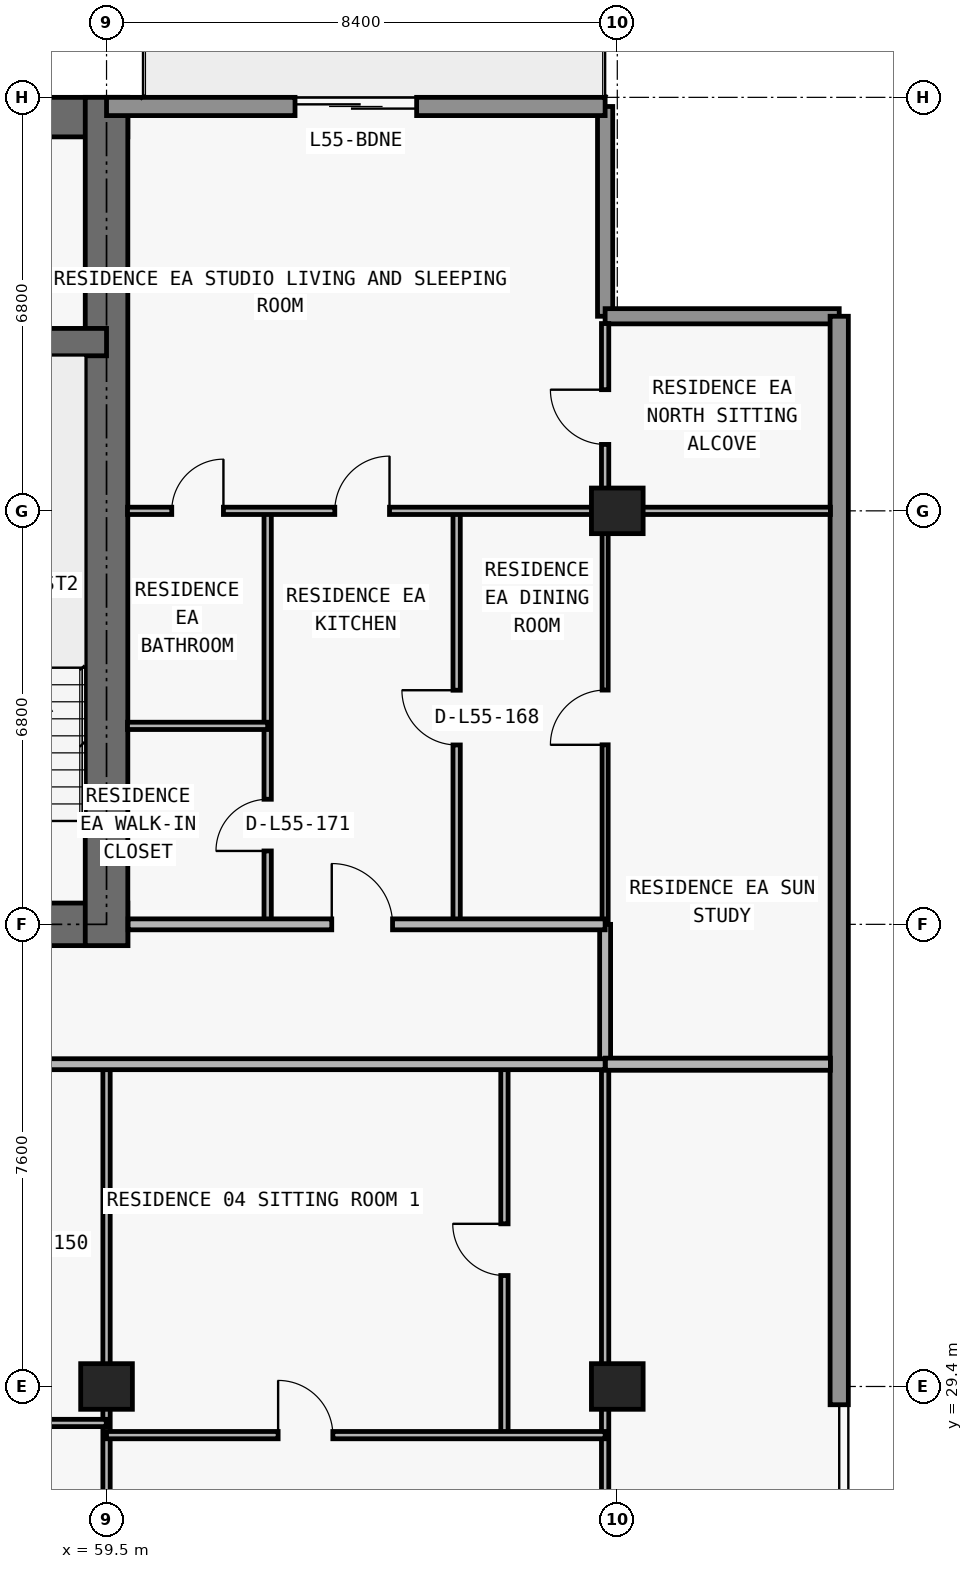
"""IFC4 building model, lengths in metres.
Left out: names, types, materials, properties, quantities, classifications, styles, units other than length and angle.
Written with IfcOpenShell. Run it as: python <this file> out.ifc"""

import sys

from ifc_helpers import new_model, si_unit, direction, frame, frame_2d, origin, origin_2d, place, context, subcontext, project, spatial, rectangle, extrude, element, fill, save


model = new_model("IFC4")
c1 = context("Model", 3, precision=1e-05, world=origin(), true_north=direction((0.0, 1.0)))
c2 = subcontext(c1, "Body", "Model", "MODEL_VIEW")
j1 = project(units=[si_unit("LENGTHUNIT", "METRE"), si_unit("PLANEANGLEUNIT", "RADIAN")], contexts=[c1])
p1 = place(None, origin())
s1 = spatial("IfcSite", under=j1, at=p1, CompositionType="ELEMENT")
p2 = place(p1, origin())
s2 = spatial("IfcBuilding", under=s1, at=p2, CompositionType="ELEMENT")
p3 = place(p2, frame((0.0, 0.0, 198.3)))
s3 = spatial("IfcBuildingStorey", under=s2, at=p3, CompositionType="ELEMENT", Elevation=198.3)
for number, where, z_axis, x_axis in (
    (1, (59.5, 29.4, 0.0), (0.0, 0.0, 1.0), (1.0, 0.0, 0.0)),
    (2, (67.9, 29.4, 0.0), (0.0, 0.0, 1.0), (1.0, 0.0, 0.0)),
    (3, (67.9, 43.8, 0.0), (0.0, 0.0, 1.0), (1.0, 0.0, 0.0)),
):
    element("IfcColumn", number, at=place(p3, frame(where, z_axis=z_axis, x_axis=x_axis)), inside=s3, PredefinedType="COLUMN", context=c2, shape_type="SweptSolid", body=[
        extrude(rectangle(XDim=0.85, YDim=0.75, at=origin_2d()), origin(), (0.0, 0.0, 1.0), 3.05),
    ])
p4 = place(p3, frame((17.95, 37.0, 0.0), z_axis=(0.0, 0.0, 1.0), x_axis=(1.0, 0.0, 0.0)))
e4 = element("IfcWall", 4, at=p4, inside=s3, PredefinedType="SHEAR", context=c2, shape_type="SweptSolid", body=[
    extrude(rectangle(XDim=41.9, YDim=0.7, at=frame_2d((20.95, 0.0))), origin(), (0.0, 0.0, 1.0), 3.05),
])
p5 = place(p4, frame((14.35, 0.0, 0.0)))
e5 = element("IfcOpeningElement", 5, at=p5, cuts=e4, PredefinedType="OPENING", context=c2, shape_type="SweptSolid", body=[
    extrude(rectangle(XDim=1.1, YDim=2.15, at=frame_2d((0.55, 1.075))), frame((0.0, 0.36, 0.0), z_axis=(0.0, -1.0, 0.0), x_axis=(1.0, 0.0, 0.0)), (0.0, 0.0, 1.0), 0.72),
])
p6 = place(p4, frame((6.2, 0.0, 0.0)))
e6 = element("IfcOpeningElement", 6, at=p6, cuts=e4, PredefinedType="OPENING", context=c2, shape_type="SweptSolid", body=[
    extrude(rectangle(XDim=1.05, YDim=2.15, at=frame_2d((0.525, 1.075))), frame((0.0, 0.36, 0.0), z_axis=(0.0, -1.0, 0.0), x_axis=(1.0, 0.0, 0.0)), (0.0, 0.0, 1.0), 0.72),
])
p7 = place(p4, frame((34.7, 0.0, 0.0)))
e7 = element("IfcOpeningElement", 7, at=p7, cuts=e4, PredefinedType="OPENING", context=c2, shape_type="SweptSolid", body=[
    extrude(rectangle(XDim=1.05, YDim=2.15, at=frame_2d((0.525, 1.075))), frame((0.0, 0.36, 0.0), z_axis=(0.0, -1.0, 0.0), x_axis=(1.0, 0.0, 0.0)), (0.0, 0.0, 1.0), 0.72),
])
p8 = place(p4, frame((10.812, 0.0, 0.0)))
e8 = element("IfcOpeningElement", 8, at=p8, cuts=e4, PredefinedType="OPENING", context=c2, shape_type="SweptSolid", body=[
    extrude(rectangle(XDim=1.05, YDim=2.15, at=frame_2d((0.525, 1.075))), frame((0.0, 0.36, 0.0), z_axis=(0.0, -1.0, 0.0), x_axis=(1.0, 0.0, 0.0)), (0.0, 0.0, 1.0), 0.72),
])
p9 = place(p4, frame((24.05, 0.0, 0.0)))
e9 = element("IfcOpeningElement", 9, at=p9, cuts=e4, PredefinedType="OPENING", context=c2, shape_type="SweptSolid", body=[
    extrude(rectangle(XDim=1.05, YDim=2.15, at=frame_2d((0.525, 1.075))), frame((0.0, 0.36, 0.0), z_axis=(0.0, -1.0, 0.0), x_axis=(1.0, 0.0, 0.0)), (0.0, 0.0, 1.0), 0.72),
])
p10 = place(p3, frame((17.95, 50.275, 0.0), z_axis=(0.0, 0.0, 1.0), x_axis=(1.0, 0.0, 0.0)))
e10 = element("IfcWall", 10, at=p10, inside=s3, PredefinedType="SHEAR", context=c2, shape_type="SweptSolid", body=[
    extrude(rectangle(XDim=41.9, YDim=0.65, at=frame_2d((20.95, 0.0))), origin(), (0.0, 0.0, 1.0), 3.05),
])
p11 = place(p3, frame((59.5, 36.65, 0.0), z_axis=(0.0, 0.0, 1.0), x_axis=(0.0, 1.0, 0.0)))
e11 = element("IfcWall", 11, at=p11, inside=s3, PredefinedType="SHEAR", context=c2, shape_type="SweptSolid", body=[
    extrude(rectangle(XDim=13.95, YDim=0.7, at=frame_2d((6.975, 0.0))), origin(), (0.0, 0.0, 1.0), 3.05),
])
p12 = place(p3, frame((18.3, 46.575, 0.0), z_axis=(0.0, 0.0, 1.0), x_axis=(1.0, 0.0, 0.0)))
e12 = element("IfcWall", 12, at=p12, inside=s3, PredefinedType="SHEAR", context=c2, shape_type="SweptSolid", body=[
    extrude(rectangle(XDim=41.2, YDim=0.45, at=frame_2d((20.6, 0.0))), origin(), (0.0, 0.0, 1.0), 3.05),
])
p13 = place(p12, frame((7.575, 0.0, 0.0)))
e13 = element("IfcOpeningElement", 13, at=p13, cuts=e12, PredefinedType="OPENING", context=c2, shape_type="SweptSolid", body=[
    extrude(rectangle(XDim=1.05, YDim=2.15, at=frame_2d((0.525, 1.075))), frame((0.0, 0.235, 0.0), z_axis=(0.0, -1.0, 0.0), x_axis=(1.0, 0.0, 0.0)), (0.0, 0.0, 1.0), 0.47),
])
p14 = place(p12, frame((32.625, 0.0, 0.0)))
e14 = element("IfcOpeningElement", 14, at=p14, cuts=e12, PredefinedType="OPENING", context=c2, shape_type="SweptSolid", body=[
    extrude(rectangle(XDim=1.05, YDim=2.15, at=frame_2d((0.525, 1.075))), frame((0.0, 0.235, 0.0), z_axis=(0.0, -1.0, 0.0), x_axis=(1.0, 0.0, 0.0)), (0.0, 0.0, 1.0), 0.47),
])
p15 = place(p3, frame((67.7, 50.45, 0.0), z_axis=(0.0, 0.0, 1.0), x_axis=(0.0, -1.0, 0.0)))
e15 = element("IfcWall", 15, at=p15, inside=s3, PredefinedType="ELEMENTEDWALL", context=c2, shape_type="SweptSolid", body=[
    extrude(rectangle(XDim=3.45, YDim=0.25, at=frame_2d((1.725, 0.0))), origin(), (0.0, 0.0, 1.0), 3.05),
])
p16 = place(p3, frame((67.7, 47.0, 0.0), z_axis=(0.0, 0.0, 1.0), x_axis=(1.0, 0.0, 0.0)))
e16 = element("IfcWall", 16, at=p16, inside=s3, PredefinedType="ELEMENTEDWALL", context=c2, shape_type="SweptSolid", body=[
    extrude(rectangle(XDim=3.85, YDim=0.25, at=frame_2d((1.925, 0.0))), origin(), (0.0, 0.0, 1.0), 3.05),
])
p17 = place(p3, frame((71.55, 47.0, 0.0), z_axis=(0.0, 0.0, 1.0), x_axis=(0.0, -1.0, 0.0)))
e17 = element("IfcWall", 17, at=p17, inside=s3, PredefinedType="STANDARD", context=c2, shape_type="SweptSolid", body=[
    extrude(rectangle(XDim=17.9, YDim=0.3, at=frame_2d((8.95, 0.0))), origin(), (0.0, 0.0, 1.0), 3.05),
])
p18 = place(p3, frame((59.5, 50.45, 0.0), z_axis=(0.0, 0.0, 1.0), x_axis=(1.0, 0.0, 0.0)))
e18 = element("IfcWall", 18, at=p18, inside=s3, PredefinedType="STANDARD", context=c2, shape_type="SweptSolid", body=[
    extrude(rectangle(XDim=8.2, YDim=0.3, at=frame_2d((4.1, 0.0))), origin(), (0.0, 0.0, 1.0), 3.05),
])
p19 = place(p18, frame((3.1, 0.0, 0.0)))
e19 = element("IfcOpeningElement", 19, at=p19, cuts=e18, PredefinedType="OPENING", context=c2, shape_type="SweptSolid", body=[
    extrude(rectangle(XDim=2.0, YDim=2.3, at=frame_2d((1.0, 1.15))), frame((0.0, 0.16, 0.0), z_axis=(0.0, -1.0, 0.0), x_axis=(1.0, 0.0, 0.0)), (0.0, 0.0, 1.0), 0.32),
])
p20 = place(p3, frame((59.5, 11.24, 0.0), z_axis=(0.0, 0.0, 1.0), x_axis=(0.0, 1.0, 0.0)))
e20 = element("IfcWall", 20, at=p20, inside=s3, PredefinedType="PARTITIONING", context=c2, shape_type="SweptSolid", body=[
    extrude(rectangle(XDim=23.46, YDim=0.12, at=frame_2d((11.73, 0.0))), origin(), (0.0, 0.0, 1.0), 2.263),
])
p21 = place(p20, frame((14.71, 0.0, 0.0)))
e21 = element("IfcOpeningElement", 21, at=p21, cuts=e20, PredefinedType="OPENING", context=c2, shape_type="SweptSolid", body=[
    extrude(rectangle(XDim=0.9, YDim=2.15, at=frame_2d((0.45, 1.075))), frame((0.0, 0.07, 0.0), z_axis=(0.0, -1.0, 0.0), x_axis=(1.0, 0.0, 0.0)), (0.0, 0.0, 1.0), 0.14),
])
p22 = place(p3, frame((62.15, 37.0, 0.0), z_axis=(0.0, 0.0, 1.0), x_axis=(0.0, 1.0, 0.0)))
e22 = element("IfcWall", 22, at=p22, inside=s3, PredefinedType="PARTITIONING", context=c2, shape_type="SweptSolid", body=[
    extrude(rectangle(XDim=6.8, YDim=0.12, at=frame_2d((3.4, 0.0))), origin(), (0.0, 0.0, 1.0), 3.05),
])
p23 = place(p22, frame((1.207, 0.0, 0.0)))
e23 = element("IfcOpeningElement", 23, at=p23, cuts=e22, PredefinedType="OPENING", context=c2, shape_type="SweptSolid", body=[
    extrude(rectangle(XDim=0.85, YDim=2.1, at=frame_2d((0.425, 1.05))), frame((0.0, 0.07, 0.0), z_axis=(0.0, -1.0, 0.0), x_axis=(1.0, 0.0, 0.0)), (0.0, 0.0, 1.0), 0.14),
])
p24 = place(p3, frame((65.258, 37.0, 0.0), z_axis=(0.0, 0.0, 1.0), x_axis=(0.0, 1.0, 0.0)))
e24 = element("IfcWall", 24, at=p24, inside=s3, PredefinedType="PARTITIONING", context=c2, shape_type="SweptSolid", body=[
    extrude(rectangle(XDim=6.8, YDim=0.12, at=frame_2d((3.4, 0.0))), origin(), (0.0, 0.0, 1.0), 3.05),
])
p25 = place(p24, frame((2.95, 0.0, 0.0)))
e25 = element("IfcOpeningElement", 25, at=p25, cuts=e24, PredefinedType="OPENING", context=c2, shape_type="SweptSolid", body=[
    extrude(rectangle(XDim=0.9, YDim=2.15, at=frame_2d((0.45, 1.075))), frame((0.0, 0.07, 0.0), z_axis=(0.0, -1.0, 0.0), x_axis=(1.0, 0.0, 0.0)), (0.0, 0.0, 1.0), 0.14),
])
p26 = place(p3, frame((66.044, 28.6, 0.0), z_axis=(0.0, 0.0, 1.0), x_axis=(0.0, 1.0, 0.0)))
e26 = element("IfcWall", 26, at=p26, inside=s3, PredefinedType="PARTITIONING", context=c2, shape_type="SweptSolid", body=[
    extrude(rectangle(XDim=6.1, YDim=0.12, at=frame_2d((3.05, 0.0))), origin(), (0.0, 0.0, 1.0), 3.05),
])
p27 = place(p26, frame((2.625, 0.0, 0.0)))
e27 = element("IfcOpeningElement", 27, at=p27, cuts=e26, PredefinedType="OPENING", context=c2, shape_type="SweptSolid", body=[
    extrude(rectangle(XDim=0.85, YDim=2.1, at=frame_2d((0.425, 1.05))), frame((0.0, 0.07, 0.0), z_axis=(0.0, -1.0, 0.0), x_axis=(1.0, 0.0, 0.0)), (0.0, 0.0, 1.0), 0.14),
])
p28 = place(p3, frame((67.7, 11.32, 0.0), z_axis=(0.0, 0.0, 1.0), x_axis=(0.0, 1.0, 0.0)))
e28 = element("IfcWall", 28, at=p28, inside=s3, PredefinedType="PARTITIONING", context=c2, shape_type="SweptSolid", body=[
    extrude(rectangle(XDim=23.38, YDim=0.12, at=frame_2d((11.69, 0.0))), origin(), (0.0, 0.0, 1.0), 2.263),
])
p29 = place(p28, frame((14.63, 0.0, 0.0)))
e29 = element("IfcOpeningElement", 29, at=p29, cuts=e28, PredefinedType="OPENING", context=c2, shape_type="SweptSolid", body=[
    extrude(rectangle(XDim=0.9, YDim=2.15, at=frame_2d((0.45, 1.075))), frame((0.0, 0.07, 0.0), z_axis=(0.0, -1.0, 0.0), x_axis=(1.0, 0.0, 0.0)), (0.0, 0.0, 1.0), 0.14),
])
p30 = place(p3, frame((67.7, 34.705, 0.0), z_axis=(0.0, 0.0, 1.0), x_axis=(0.0, 1.0, 0.0)))
e30 = element("IfcWall", 30, at=p30, inside=s3, PredefinedType="PARTITIONING", context=c2, shape_type="SweptSolid", body=[
    extrude(rectangle(XDim=2.295, YDim=0.18, at=frame_2d((1.147, 0.0))), origin(), (0.0, 0.0, 1.0), 2.263),
])
p31 = place(p3, frame((67.7, 37.005, 0.0), z_axis=(0.0, 0.0, 1.0), x_axis=(0.0, 1.0, 0.0)))
e31 = element("IfcWall", 31, at=p31, inside=s3, PredefinedType="MOVABLE", context=c2, shape_type="SweptSolid", body=[
    extrude(rectangle(XDim=6.795, YDim=0.1, at=frame_2d((3.397, 0.0))), origin(), (0.0, 0.0, 1.0), 2.263),
])
p32 = place(p31, frame((2.948, 0.0, 0.0)))
e32 = element("IfcOpeningElement", 32, at=p32, cuts=e31, PredefinedType="OPENING", context=c2, shape_type="SweptSolid", body=[
    extrude(rectangle(XDim=0.9, YDim=2.15, at=frame_2d((0.45, 1.075))), frame((0.0, 0.06, 0.0), z_axis=(0.0, -1.0, 0.0), x_axis=(1.0, 0.0, 0.0)), (0.0, 0.0, 1.0), 0.12),
])
p33 = place(p3, frame((67.7, 43.805, 0.0), z_axis=(0.0, 0.0, 1.0), x_axis=(0.0, 1.0, 0.0)))
e33 = element("IfcWall", 33, at=p33, inside=s3, PredefinedType="PARTITIONING", context=c2, shape_type="SweptSolid", body=[
    extrude(rectangle(XDim=3.075, YDim=0.12, at=frame_2d((1.538, 0.0))), origin(), (0.0, 0.0, 1.0), 3.05),
])
p34 = place(p33, frame((1.087, 0.0, 0.0)))
e34 = element("IfcOpeningElement", 34, at=p34, cuts=e33, PredefinedType="OPENING", context=c2, shape_type="SweptSolid", body=[
    extrude(rectangle(XDim=0.9, YDim=2.15, at=frame_2d((0.45, 1.075))), frame((0.0, 0.07, 0.0), z_axis=(0.0, -1.0, 0.0), x_axis=(1.0, 0.0, 0.0)), (0.0, 0.0, 1.0), 0.14),
])
p35 = place(p3, frame((59.5, 28.6, 0.0), z_axis=(0.0, 0.0, 1.0), x_axis=(1.0, 0.0, 0.0)))
e35 = element("IfcWall", 35, at=p35, inside=s3, PredefinedType="PARTITIONING", context=c2, shape_type="SweptSolid", body=[
    extrude(rectangle(XDim=8.2, YDim=0.12, at=frame_2d((4.1, 0.0))), origin(), (0.0, 0.0, 1.0), 3.05),
])
p36 = place(p35, frame((2.822, 0.0, 0.0)))
e36 = element("IfcOpeningElement", 36, at=p36, cuts=e35, PredefinedType="OPENING", context=c2, shape_type="SweptSolid", body=[
    extrude(rectangle(XDim=0.9, YDim=2.15, at=frame_2d((0.45, 1.075))), frame((0.0, 0.07, 0.0), z_axis=(0.0, -1.0, 0.0), x_axis=(1.0, 0.0, 0.0)), (0.0, 0.0, 1.0), 0.14),
])
p37 = place(p3, frame((51.32, 28.8, 0.0), z_axis=(0.0, 0.0, 1.0), x_axis=(1.0, 0.0, 0.0)))
e37 = element("IfcWall", 37, at=p37, inside=s3, PredefinedType="PARTITIONING", context=c2, shape_type="SweptSolid", body=[
    extrude(rectangle(XDim=8.175, YDim=0.12, at=frame_2d((4.087, 0.0))), origin(), (0.0, 0.0, 1.0), 3.05),
])
p38 = place(p37, frame((1.204, 0.0, 0.0)))
e38 = element("IfcOpeningElement", 38, at=p38, cuts=e37, PredefinedType="OPENING", context=c2, shape_type="SweptSolid", body=[
    extrude(rectangle(XDim=0.9, YDim=2.15, at=frame_2d((0.45, 1.075))), frame((0.0, 0.07, 0.0), z_axis=(0.0, -1.0, 0.0), x_axis=(1.0, 0.0, 0.0)), (0.0, 0.0, 1.0), 0.14),
])
p39 = place(p3, frame((10.105, 34.7, 0.0), z_axis=(0.0, 0.0, 1.0), x_axis=(1.0, 0.0, 0.0)))
e39 = element("IfcWall", 39, at=p39, inside=s3, PredefinedType="PARTITIONING", context=c2, shape_type="SweptSolid", body=[
    extrude(rectangle(XDim=57.595, YDim=0.18, at=frame_2d((28.797, 0.0))), origin(), (0.0, 0.0, 1.0), 3.05),
])
p40 = place(p39, frame((2.365, 0.0, 0.0)))
e40 = element("IfcOpeningElement", 40, at=p40, cuts=e39, PredefinedType="OPENING", context=c2, shape_type="SweptSolid", body=[
    extrude(rectangle(XDim=1.0, YDim=2.2, at=frame_2d((0.5, 1.1))), frame((0.0, 0.1, 0.0), z_axis=(0.0, -1.0, 0.0), x_axis=(1.0, 0.0, 0.0)), (0.0, 0.0, 1.0), 0.2),
])
p41 = place(p39, frame((10.833, 0.0, 0.0)))
e41 = element("IfcOpeningElement", 41, at=p41, cuts=e39, PredefinedType="OPENING", context=c2, shape_type="SweptSolid", body=[
    extrude(rectangle(XDim=1.0, YDim=2.2, at=frame_2d((0.5, 1.1))), frame((0.0, 0.1, 0.0), z_axis=(0.0, -1.0, 0.0), x_axis=(1.0, 0.0, 0.0)), (0.0, 0.0, 1.0), 0.2),
])
p42 = place(p39, frame((19.422, 0.0, 0.0)))
e42 = element("IfcOpeningElement", 42, at=p42, cuts=e39, PredefinedType="OPENING", context=c2, shape_type="SweptSolid", body=[
    extrude(rectangle(XDim=1.0, YDim=2.2, at=frame_2d((0.5, 1.1))), frame((0.0, 0.1, 0.0), z_axis=(0.0, -1.0, 0.0), x_axis=(1.0, 0.0, 0.0)), (0.0, 0.0, 1.0), 0.2),
])
p43 = place(p39, frame((43.865, 0.0, 0.0)))
e43 = element("IfcOpeningElement", 43, at=p43, cuts=e39, PredefinedType="OPENING", context=c2, shape_type="SweptSolid", body=[
    extrude(rectangle(XDim=1.0, YDim=2.2, at=frame_2d((0.5, 1.1))), frame((0.0, 0.1, 0.0), z_axis=(0.0, -1.0, 0.0), x_axis=(1.0, 0.0, 0.0)), (0.0, 0.0, 1.0), 0.2),
])
p44 = place(p3, frame((67.705, 34.7, 0.0), z_axis=(0.0, 0.0, 1.0), x_axis=(1.0, 0.0, 0.0)))
e44 = element("IfcWall", 44, at=p44, inside=s3, PredefinedType="PARTITIONING", context=c2, shape_type="SweptSolid", body=[
    extrude(rectangle(XDim=3.7, YDim=0.2, at=frame_2d((1.85, 0.0))), origin(), (0.0, 0.0, 1.0), 3.05),
])
p45 = place(p3, frame((59.855, 37.0, 0.0), z_axis=(0.0, 0.0, 1.0), x_axis=(1.0, 0.0, 0.0)))
e45 = element("IfcWall", 45, at=p45, inside=s3, PredefinedType="PARTITIONING", context=c2, shape_type="SweptSolid", body=[
    extrude(rectangle(XDim=7.845, YDim=0.18, at=frame_2d((3.922, 0.0))), origin(), (0.0, 0.0, 1.0), 3.05),
])
p46 = place(p45, frame((3.349, 0.0, 0.0)))
e46 = element("IfcOpeningElement", 46, at=p46, cuts=e45, PredefinedType="OPENING", context=c2, shape_type="SweptSolid", body=[
    extrude(rectangle(XDim=1.0, YDim=2.2, at=frame_2d((0.5, 1.1))), frame((0.0, 0.1, 0.0), z_axis=(0.0, -1.0, 0.0), x_axis=(1.0, 0.0, 0.0)), (0.0, 0.0, 1.0), 0.2),
])
p47 = place(p3, frame((59.845, 40.264, 0.0), z_axis=(0.0, 0.0, 1.0), x_axis=(1.0, 0.0, 0.0)))
e47 = element("IfcWall", 47, at=p47, inside=s3, PredefinedType="PARTITIONING", context=c2, shape_type="SweptSolid", body=[
    extrude(rectangle(XDim=2.305, YDim=0.12, at=frame_2d((1.152, 0.0))), origin(), (0.0, 0.0, 1.0), 3.05),
])
p48 = place(p3, frame((59.845, 43.8, 0.0), z_axis=(0.0, 0.0, 1.0), x_axis=(1.0, 0.0, 0.0)))
e48 = element("IfcWall", 48, at=p48, inside=s3, PredefinedType="PARTITIONING", context=c2, shape_type="SweptSolid", body=[
    extrude(rectangle(XDim=11.56, YDim=0.12, at=frame_2d((5.78, 0.0))), origin(), (0.0, 0.0, 1.0), 2.418),
])
p49 = place(p48, frame((3.409, 0.0, 0.0)))
e49 = element("IfcOpeningElement", 49, at=p49, cuts=e48, PredefinedType="OPENING", context=c2, shape_type="SweptSolid", body=[
    extrude(rectangle(XDim=0.9, YDim=2.15, at=frame_2d((0.45, 1.075))), frame((0.0, 0.07, 0.0), z_axis=(0.0, -1.0, 0.0), x_axis=(1.0, 0.0, 0.0)), (0.0, 0.0, 1.0), 0.14),
])
p50 = place(p48, frame((0.728, 0.0, 0.0)))
e50 = element("IfcOpeningElement", 50, at=p50, cuts=e48, PredefinedType="OPENING", context=c2, shape_type="SweptSolid", body=[
    extrude(rectangle(XDim=0.85, YDim=2.1, at=frame_2d((0.425, 1.05))), frame((0.0, 0.07, 0.0), z_axis=(0.0, -1.0, 0.0), x_axis=(1.0, 0.0, 0.0)), (0.0, 0.0, 1.0), 0.14),
])
p51 = place(p19, origin())
e51 = element("IfcDoor", 51, at=p51, inside=s3, OperationType="DOUBLE_DOOR_SLIDING", PredefinedType="DOOR", context=c2, shape_type="SweptSolid", body=[
    extrude(rectangle(XDim=2.0, YDim=2.3, at=frame_2d((1.0, 1.15))), frame((0.0, 0.025, 0.0), z_axis=(0.0, -1.0, 0.0), x_axis=(1.0, 0.0, 0.0)), (0.0, 0.0, 1.0), 0.05),
])
fill(e19, e51)
p52 = place(p36, origin())
e52 = element("IfcDoor", 52, at=p52, inside=s3, OperationType="SINGLE_SWING_LEFT", PredefinedType="DOOR", context=c2, shape_type="SweptSolid", body=[
    extrude(rectangle(XDim=0.9, YDim=2.15, at=frame_2d((0.45, 1.075))), frame((0.0, 0.025, 0.0), z_axis=(0.0, -1.0, 0.0), x_axis=(1.0, 0.0, 0.0)), (0.0, 0.0, 1.0), 0.05),
])
fill(e36, e52)
p53 = place(p27, origin())
e53 = element("IfcDoor", 53, at=p53, inside=s3, OperationType="SINGLE_SWING_RIGHT", PredefinedType="DOOR", context=c2, shape_type="SweptSolid", body=[
    extrude(rectangle(XDim=0.85, YDim=2.1, at=frame_2d((0.425, 1.05))), frame((0.0, 0.025, 0.0), z_axis=(0.0, -1.0, 0.0), x_axis=(1.0, 0.0, 0.0)), (0.0, 0.0, 1.0), 0.05),
])
fill(e27, e53)
p54 = place(p25, origin())
e54 = element("IfcDoor", 54, at=p54, inside=s3, OperationType="SINGLE_SWING_RIGHT", PredefinedType="DOOR", context=c2, shape_type="SweptSolid", body=[
    extrude(rectangle(XDim=0.9, YDim=2.15, at=frame_2d((0.45, 1.075))), frame((0.0, 0.025, 0.0), z_axis=(0.0, -1.0, 0.0), x_axis=(1.0, 0.0, 0.0)), (0.0, 0.0, 1.0), 0.05),
])
fill(e25, e54)
p55 = place(p46, origin())
e55 = element("IfcDoor", 55, at=p55, inside=s3, OperationType="SINGLE_SWING_LEFT", PredefinedType="DOOR", context=c2, shape_type="SweptSolid", body=[
    extrude(rectangle(XDim=1.0, YDim=2.2, at=frame_2d((0.5, 1.1))), frame((0.0, 0.025, 0.0), z_axis=(0.0, -1.0, 0.0), x_axis=(1.0, 0.0, 0.0)), (0.0, 0.0, 1.0), 0.05),
])
fill(e46, e55)
p56 = place(p49, origin())
e56 = element("IfcDoor", 56, at=p56, inside=s3, OperationType="SINGLE_SWING_RIGHT", PredefinedType="DOOR", context=c2, shape_type="SweptSolid", body=[
    extrude(rectangle(XDim=0.9, YDim=2.15, at=frame_2d((0.45, 1.075))), frame((0.0, 0.025, 0.0), z_axis=(0.0, -1.0, 0.0), x_axis=(1.0, 0.0, 0.0)), (0.0, 0.0, 1.0), 0.05),
])
fill(e49, e56)
p57 = place(p23, origin())
e57 = element("IfcDoor", 57, at=p57, inside=s3, OperationType="SINGLE_SWING_LEFT", PredefinedType="DOOR", context=c2, shape_type="SweptSolid", body=[
    extrude(rectangle(XDim=0.85, YDim=2.1, at=frame_2d((0.425, 1.05))), frame((0.0, 0.025, 0.0), z_axis=(0.0, -1.0, 0.0), x_axis=(1.0, 0.0, 0.0)), (0.0, 0.0, 1.0), 0.05),
])
fill(e23, e57)
p58 = place(p50, origin())
e58 = element("IfcDoor", 58, at=p58, inside=s3, OperationType="SINGLE_SWING_RIGHT", PredefinedType="DOOR", context=c2, shape_type="SweptSolid", body=[
    extrude(rectangle(XDim=0.85, YDim=2.1, at=frame_2d((0.425, 1.05))), frame((0.0, 0.025, 0.0), z_axis=(0.0, -1.0, 0.0), x_axis=(1.0, 0.0, 0.0)), (0.0, 0.0, 1.0), 0.05),
])
fill(e50, e58)
p59 = place(p32, origin())
e59 = element("IfcDoor", 59, at=p59, inside=s3, OperationType="SINGLE_SWING_LEFT", PredefinedType="DOOR", context=c2, shape_type="SweptSolid", body=[
    extrude(rectangle(XDim=0.9, YDim=2.15, at=frame_2d((0.45, 1.075))), frame((0.0, 0.025, 0.0), z_axis=(0.0, -1.0, 0.0), x_axis=(1.0, 0.0, 0.0)), (0.0, 0.0, 1.0), 0.05),
])
fill(e32, e59)
p60 = place(p34, origin())
e60 = element("IfcDoor", 60, at=p60, inside=s3, OperationType="SINGLE_SWING_RIGHT", PredefinedType="DOOR", context=c2, shape_type="SweptSolid", body=[
    extrude(rectangle(XDim=0.9, YDim=2.15, at=frame_2d((0.45, 1.075))), frame((0.0, 0.025, 0.0), z_axis=(0.0, -1.0, 0.0), x_axis=(1.0, 0.0, 0.0)), (0.0, 0.0, 1.0), 0.05),
])
fill(e34, e60)
save(model, sys.argv[1])
